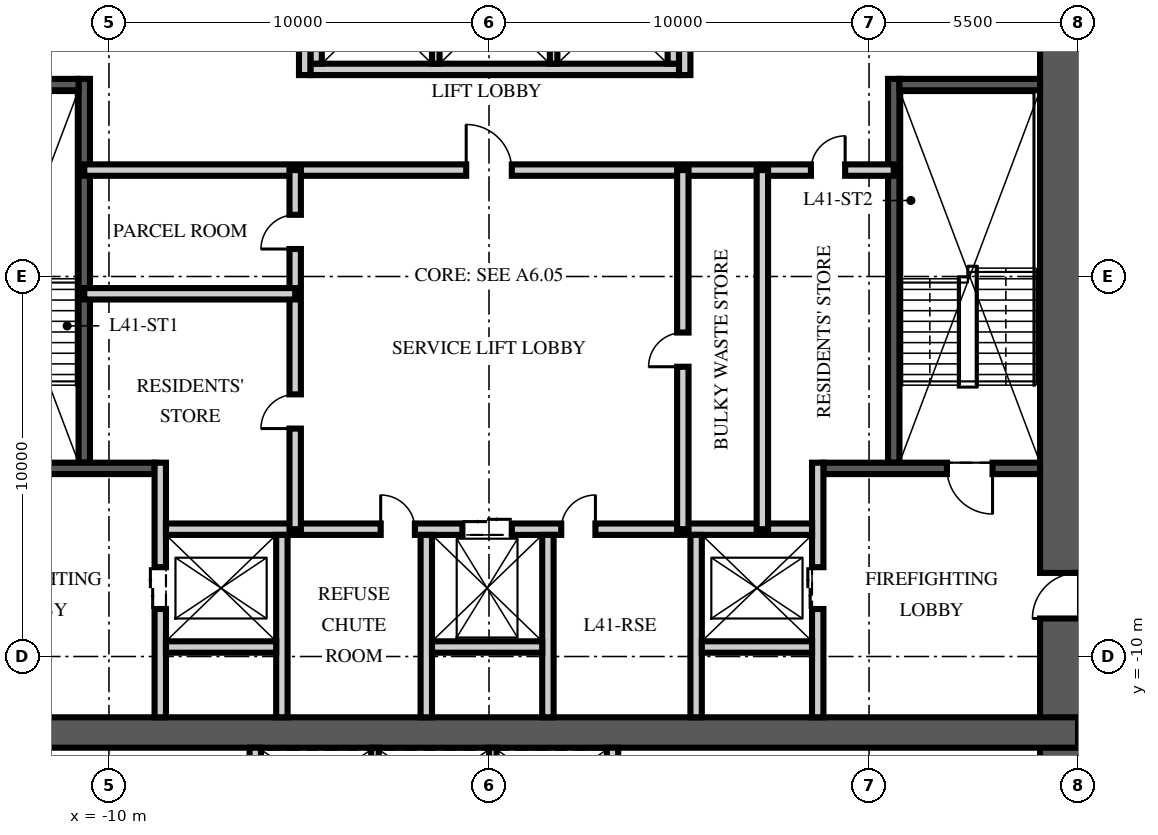
"""IFC4 building model, lengths in metres.
Left out: names, types, materials, properties, quantities, classifications, styles, units other than length and angle.
Written with IfcOpenShell. Run it as: python <this file> out.ifc"""

import sys

from ifc_helpers import new_model, si_unit, direction, frame, frame_2d, origin, place, context, subcontext, project, spatial, rectangle, extrude, element, fill, save


model = new_model("IFC4")
c1 = context("Model", 3, precision=1e-05, world=origin(), true_north=direction((0.0, 1.0)))
c2 = subcontext(c1, "Body", "Model", "MODEL_VIEW")
j1 = project(units=[si_unit("LENGTHUNIT", "METRE"), si_unit("PLANEANGLEUNIT", "RADIAN")], contexts=[c1])
p1 = place(None, origin())
s1 = spatial("IfcSite", under=j1, at=p1, CompositionType="ELEMENT")
p2 = place(p1, origin())
s2 = spatial("IfcBuilding", under=s1, at=p2, CompositionType="ELEMENT")
p3 = place(p2, frame((0.0, 0.0, 163.5)))
s3 = spatial("IfcBuildingStorey", under=s2, at=p3, CompositionType="ELEMENT", Elevation=163.5)
p4 = place(p3, frame((15.5, -15.5, -0.25), z_axis=(0.0, 0.0, 1.0), x_axis=(0.0, 1.0, 0.0)))
e1 = element("IfcWall", 1, at=p4, inside=s3, PredefinedType="SHEAR", context=c2, shape_type="SweptSolid", body=[
    extrude(rectangle(XDim=31.0, YDim=2.0, at=frame_2d((15.5, 0.0))), origin(), (0.0, 0.0, 1.0), 3.75),
])
p5 = place(p4, frame((6.5, 0.0, 0.25)))
e2 = element("IfcOpeningElement", 2, at=p5, cuts=e1, PredefinedType="OPENING", context=c2, shape_type="SweptSolid", body=[
    extrude(rectangle(XDim=1.2, YDim=2.1, at=frame_2d((0.6, 1.05))), frame((0.0, 1.01, 0.0), z_axis=(0.0, -1.0, 0.0), x_axis=(1.0, 0.0, 0.0)), (0.0, 0.0, 1.0), 2.02),
])
p6 = place(p4, frame((23.0, 0.0, 0.25)))
e3 = element("IfcOpeningElement", 3, at=p6, cuts=e1, PredefinedType="OPENING", context=c2, shape_type="SweptSolid", body=[
    extrude(rectangle(XDim=1.8, YDim=2.1, at=frame_2d((0.9, 1.05))), frame((0.0, 1.01, 0.0), z_axis=(0.0, -1.0, 0.0), x_axis=(1.0, 0.0, 0.0)), (0.0, 0.0, 1.0), 2.02),
])
p7 = place(p3, frame((-15.5, -12.0, -0.25), z_axis=(0.0, 0.0, 1.0), x_axis=(1.0, 0.0, 0.0)))
e4 = element("IfcWall", 4, at=p7, inside=s3, PredefinedType="SHEAR", context=c2, shape_type="SweptSolid", body=[
    extrude(rectangle(XDim=31.0, YDim=0.8, at=frame_2d((15.5, 0.0))), origin(), (0.0, 0.0, 1.0), 3.75),
])
p8 = place(p3, frame((-10.65, -4.9, 0.0), z_axis=(0.0, 0.0, 1.0), x_axis=(0.0, 1.0, 0.0)))
e5 = element("IfcWall", 5, at=p8, inside=s3, PredefinedType="SOLIDWALL", context=c2, shape_type="SweptSolid", body=[
    extrude(rectangle(XDim=10.1, YDim=0.3, at=frame_2d((5.05, 0.0))), origin(), (0.0, 0.0, 1.0), 3.5),
])
p9 = place(p3, frame((-14.5, -5.05, 0.0), z_axis=(0.0, 0.0, 1.0), x_axis=(1.0, 0.0, 0.0)))
e6 = element("IfcWall", 6, at=p9, inside=s3, PredefinedType="SOLIDWALL", context=c2, shape_type="SweptSolid", body=[
    extrude(rectangle(XDim=5.7, YDim=0.3, at=frame_2d((2.85, 0.0))), origin(), (0.0, 0.0, 1.0), 3.5),
])
p10 = place(p9, frame((1.25, 0.0, 0.0)))
e7 = element("IfcOpeningElement", 7, at=p10, cuts=e6, PredefinedType="OPENING", context=c2, shape_type="SweptSolid", body=[
    extrude(rectangle(XDim=1.2, YDim=2.1, at=frame_2d((0.6, 1.05))), frame((0.0, 0.16, 0.0), z_axis=(0.0, -1.0, 0.0), x_axis=(1.0, 0.0, 0.0)), (0.0, 0.0, 1.0), 0.32),
])
p11 = place(p3, frame((-14.5, 5.05, 0.0), z_axis=(0.0, 0.0, 1.0), x_axis=(1.0, 0.0, 0.0)))
e8 = element("IfcWall", 8, at=p11, inside=s3, PredefinedType="SOLIDWALL", context=c2, shape_type="SweptSolid", body=[
    extrude(rectangle(XDim=3.7, YDim=0.3, at=frame_2d((1.85, 0.0))), origin(), (0.0, 0.0, 1.0), 3.5),
])
p12 = place(p3, frame((-8.65, -11.6, 0.0), z_axis=(0.0, 0.0, 1.0), x_axis=(0.0, 1.0, 0.0)))
e9 = element("IfcWall", 9, at=p12, inside=s3, PredefinedType="PARTITIONING", context=c2, shape_type="SweptSolid", body=[
    extrude(rectangle(XDim=6.7, YDim=0.3, at=frame_2d((3.35, 0.0))), origin(), (0.0, 0.0, 1.0), 3.5),
])
p13 = place(p12, frame((2.85, 0.0, 0.0)))
e10 = element("IfcOpeningElement", 10, at=p13, cuts=e9, PredefinedType="OPENING", context=c2, shape_type="SweptSolid", body=[
    extrude(rectangle(XDim=1.1, YDim=2.1, at=frame_2d((0.55, 1.05))), frame((0.0, 0.16, 0.0), z_axis=(0.0, -1.0, 0.0), x_axis=(1.0, 0.0, 0.0)), (0.0, 0.0, 1.0), 0.32),
])
p14 = place(p3, frame((10.65, -4.9, 0.0), z_axis=(0.0, 0.0, 1.0), x_axis=(0.0, 1.0, 0.0)))
e11 = element("IfcWall", 11, at=p14, inside=s3, PredefinedType="SOLIDWALL", context=c2, shape_type="SweptSolid", body=[
    extrude(rectangle(XDim=10.1, YDim=0.3, at=frame_2d((5.05, 0.0))), origin(), (0.0, 0.0, 1.0), 3.5),
])
p15 = place(p3, frame((14.5, -5.05, 0.0), z_axis=(0.0, 0.0, 1.0), x_axis=(-1.0, 0.0, 0.0)))
e12 = element("IfcWall", 12, at=p15, inside=s3, PredefinedType="SOLIDWALL", context=c2, shape_type="SweptSolid", body=[
    extrude(rectangle(XDim=5.7, YDim=0.3, at=frame_2d((2.85, 0.0))), origin(), (0.0, 0.0, 1.0), 3.5),
])
p16 = place(p15, frame((1.25, 0.0, 0.0)))
e13 = element("IfcOpeningElement", 13, at=p16, cuts=e12, PredefinedType="OPENING", context=c2, shape_type="SweptSolid", body=[
    extrude(rectangle(XDim=1.2, YDim=2.1, at=frame_2d((0.6, 1.05))), frame((0.0, 0.16, 0.0), z_axis=(0.0, -1.0, 0.0), x_axis=(1.0, 0.0, 0.0)), (0.0, 0.0, 1.0), 0.32),
])
p17 = place(p3, frame((14.5, 5.05, 0.0), z_axis=(0.0, 0.0, 1.0), x_axis=(-1.0, 0.0, 0.0)))
e14 = element("IfcWall", 14, at=p17, inside=s3, PredefinedType="SOLIDWALL", context=c2, shape_type="SweptSolid", body=[
    extrude(rectangle(XDim=3.7, YDim=0.3, at=frame_2d((1.85, 0.0))), origin(), (0.0, 0.0, 1.0), 3.5),
])
p18 = place(p3, frame((8.65, -11.6, 0.0), z_axis=(0.0, 0.0, 1.0), x_axis=(0.0, 1.0, 0.0)))
e15 = element("IfcWall", 15, at=p18, inside=s3, PredefinedType="PARTITIONING", context=c2, shape_type="SweptSolid", body=[
    extrude(rectangle(XDim=6.7, YDim=0.3, at=frame_2d((3.35, 0.0))), origin(), (0.0, 0.0, 1.0), 3.5),
])
p19 = place(p18, frame((2.85, 0.0, 0.0)))
e16 = element("IfcOpeningElement", 16, at=p19, cuts=e15, PredefinedType="OPENING", context=c2, shape_type="SweptSolid", body=[
    extrude(rectangle(XDim=1.1, YDim=2.1, at=frame_2d((0.55, 1.05))), frame((0.0, 0.16, 0.0), z_axis=(0.0, -1.0, 0.0), x_axis=(1.0, 0.0, 0.0)), (0.0, 0.0, 1.0), 0.32),
])
p20 = place(p3, frame((-8.5, -6.65, 0.0), z_axis=(0.0, 0.0, 1.0), x_axis=(1.0, 0.0, 0.0)))
e17 = element("IfcWall", 17, at=p20, inside=s3, PredefinedType="PARTITIONING", context=c2, shape_type="SweptSolid", body=[
    extrude(rectangle(XDim=17.0, YDim=0.3, at=frame_2d((8.5, 0.0))), origin(), (0.0, 0.0, 1.0), 3.5),
])
p21 = place(p20, frame((7.8, 0.0, 0.0)))
e18 = element("IfcOpeningElement", 18, at=p21, cuts=e17, PredefinedType="OPENING", context=c2, shape_type="SweptSolid", body=[
    extrude(rectangle(XDim=1.3, YDim=2.4, at=frame_2d((0.65, 1.2))), frame((0.0, 0.16, 0.0), z_axis=(0.0, -1.0, 0.0), x_axis=(1.0, 0.0, 0.0)), (0.0, 0.0, 1.0), 0.32),
])
p22 = place(p20, frame((5.65, 0.0, 0.0)))
e19 = element("IfcOpeningElement", 19, at=p22, cuts=e17, PredefinedType="OPENING", context=c2, shape_type="SweptSolid", body=[
    extrude(rectangle(XDim=0.9, YDim=2.1, at=frame_2d((0.45, 1.05))), frame((0.0, 0.16, 0.0), z_axis=(0.0, -1.0, 0.0), x_axis=(1.0, 0.0, 0.0)), (0.0, 0.0, 1.0), 0.32),
])
p23 = place(p20, frame((10.4, 0.0, 0.0)))
e20 = element("IfcOpeningElement", 20, at=p23, cuts=e17, PredefinedType="OPENING", context=c2, shape_type="SweptSolid", body=[
    extrude(rectangle(XDim=0.9, YDim=2.1, at=frame_2d((0.45, 1.05))), frame((0.0, 0.16, 0.0), z_axis=(0.0, -1.0, 0.0), x_axis=(1.0, 0.0, 0.0)), (0.0, 0.0, 1.0), 0.32),
])
for number, where, z_axis, x_axis in (
    (21, (-5.45, -11.6, 0.0), (0.0, 0.0, 1.0), (0.0, 1.0, 0.0)),
    (22, (-1.65, -11.6, 0.0), (0.0, 0.0, 1.0), (0.0, 1.0, 0.0)),
    (23, (1.55, -11.6, 0.0), (0.0, 0.0, 1.0), (0.0, 1.0, 0.0)),
    (24, (5.45, -11.6, 0.0), (0.0, 0.0, 1.0), (0.0, 1.0, 0.0)),
):
    element("IfcWall", number, at=place(p3, frame(where, z_axis=z_axis, x_axis=x_axis)), inside=s3, PredefinedType="PARTITIONING", context=c2, shape_type="SweptSolid", body=[
        extrude(rectangle(XDim=4.8, YDim=0.3, at=frame_2d((2.4, 0.0))), origin(), (0.0, 0.0, 1.0), 3.5),
    ])
for number, where, z_axis, x_axis in (
    (25, (-8.5, -9.75, 0.0), (0.0, 0.0, 1.0), (1.0, 0.0, 0.0)),
    (26, (-1.5, -9.75, 0.0), (0.0, 0.0, 1.0), (1.0, 0.0, 0.0)),
    (27, (5.6, -9.75, 0.0), (0.0, 0.0, 1.0), (1.0, 0.0, 0.0)),
):
    element("IfcWall", number, at=place(p3, frame(where, z_axis=z_axis, x_axis=x_axis)), inside=s3, PredefinedType="PARTITIONING", context=c2, shape_type="SweptSolid", body=[
        extrude(rectangle(XDim=2.9, YDim=0.3, at=frame_2d((1.45, 0.0))), origin(), (0.0, 0.0, 1.0), 3.5),
    ])
p24 = place(p3, frame((-4.7, 5.45, 0.0), z_axis=(0.0, 0.0, 1.0), x_axis=(1.0, 0.0, 0.0)))
e28 = element("IfcWall", 28, at=p24, inside=s3, PredefinedType="PARTITIONING", context=c2, shape_type="SweptSolid", body=[
    extrude(rectangle(XDim=9.7, YDim=0.3, at=frame_2d((4.85, 0.0))), origin(), (0.0, 0.0, 1.0), 3.5),
])
for number, where, z_axis, x_axis in (
    (29, (-4.55, 5.6, 0.0), (0.0, 0.0, 1.0), (0.0, 1.0, 0.0)),
    (30, (4.85, 5.6, 0.0), (0.0, 0.0, 1.0), (0.0, 1.0, 0.0)),
):
    element("IfcWall", number, at=place(p3, frame(where, z_axis=z_axis, x_axis=x_axis)), inside=s3, PredefinedType="PARTITIONING", context=c2, shape_type="SweptSolid", body=[
        extrude(rectangle(XDim=2.8, YDim=0.3, at=frame_2d((1.4, 0.0))), origin(), (0.0, 0.0, 1.0), 3.5),
    ])
for number, where, z_axis, x_axis in (
    (31, (-1.4, 5.6, 0.0), (0.0, 0.0, 1.0), (0.0, 1.0, 0.0)),
    (32, (1.7, 5.6, 0.0), (0.0, 0.0, 1.0), (0.0, 1.0, 0.0)),
):
    element("IfcWall", number, at=place(p3, frame(where, z_axis=z_axis, x_axis=x_axis)), inside=s3, PredefinedType="PARTITIONING", context=c2, shape_type="SweptSolid", body=[
        extrude(rectangle(XDim=2.8, YDim=0.2, at=frame_2d((1.4, 0.0))), origin(), (0.0, 0.0, 1.0), 3.5),
    ])
for number, where, z_axis, x_axis in (
    (33, (-6.15, -14.5, 0.0), (0.0, 0.0, 1.0), (0.0, 1.0, 0.0)),
    (34, (3.25, -14.5, 0.0), (0.0, 0.0, 1.0), (0.0, 1.0, 0.0)),
):
    element("IfcWall", number, at=place(p3, frame(where, z_axis=z_axis, x_axis=x_axis)), inside=s3, PredefinedType="PARTITIONING", context=c2, shape_type="SweptSolid", body=[
        extrude(rectangle(XDim=2.1, YDim=0.3, at=frame_2d((1.05, 0.0))), origin(), (0.0, 0.0, 1.0), 3.5),
    ])
for number, where, z_axis, x_axis in (
    (35, (-3.0, -14.5, 0.0), (0.0, 0.0, 1.0), (0.0, 1.0, 0.0)),
    (36, (0.1, -14.5, 0.0), (0.0, 0.0, 1.0), (0.0, 1.0, 0.0)),
):
    element("IfcWall", number, at=place(p3, frame(where, z_axis=z_axis, x_axis=x_axis)), inside=s3, PredefinedType="PARTITIONING", context=c2, shape_type="SweptSolid", body=[
        extrude(rectangle(XDim=2.1, YDim=0.2, at=frame_2d((1.05, 0.0))), origin(), (0.0, 0.0, 1.0), 3.5),
    ])
p25 = place(p3, frame((-10.65, 2.8, 0.0), z_axis=(0.0, 0.0, 1.0), x_axis=(1.0, 0.0, 0.0)))
e37 = element("IfcWall", 37, at=p25, inside=s3, PredefinedType="PARTITIONING", context=c2, shape_type="SweptSolid", body=[
    extrude(rectangle(XDim=21.3, YDim=0.3, at=frame_2d((10.65, 0.0))), origin(), (0.0, 0.0, 1.0), 3.5),
])
p26 = place(p25, frame((10.05, 0.0, 0.0)))
e38 = element("IfcOpeningElement", 38, at=p26, cuts=e37, PredefinedType="OPENING", context=c2, shape_type="SweptSolid", body=[
    extrude(rectangle(XDim=1.2, YDim=2.1, at=frame_2d((0.6, 1.05))), frame((0.0, 0.16, 0.0), z_axis=(0.0, -1.0, 0.0), x_axis=(1.0, 0.0, 0.0)), (0.0, 0.0, 1.0), 0.32),
])
p27 = place(p25, frame((19.121, 0.0, 0.0)))
e39 = element("IfcOpeningElement", 39, at=p27, cuts=e37, PredefinedType="OPENING", context=c2, shape_type="SweptSolid", body=[
    extrude(rectangle(XDim=0.9, YDim=2.1, at=frame_2d((0.45, 1.05))), frame((0.0, 0.16, 0.0), z_axis=(0.0, -1.0, 0.0), x_axis=(1.0, 0.0, 0.0)), (0.0, 0.0, 1.0), 0.32),
])
p28 = place(p3, frame((-5.1, -6.65, 0.0), z_axis=(0.0, 0.0, 1.0), x_axis=(0.0, 1.0, 0.0)))
e40 = element("IfcWall", 40, at=p28, inside=s3, PredefinedType="PARTITIONING", context=c2, shape_type="SweptSolid", body=[
    extrude(rectangle(XDim=9.45, YDim=0.3, at=frame_2d((4.725, 0.0))), origin(), (0.0, 0.0, 1.0), 3.5),
])
p29 = place(p28, frame((2.648, 0.0, 0.0)))
e41 = element("IfcOpeningElement", 41, at=p29, cuts=e40, PredefinedType="OPENING", context=c2, shape_type="SweptSolid", body=[
    extrude(rectangle(XDim=0.9, YDim=2.1, at=frame_2d((0.45, 1.05))), frame((0.0, 0.16, 0.0), z_axis=(0.0, -1.0, 0.0), x_axis=(1.0, 0.0, 0.0)), (0.0, 0.0, 1.0), 0.32),
])
p30 = place(p28, frame((7.373, 0.0, 0.0)))
e42 = element("IfcOpeningElement", 42, at=p30, cuts=e40, PredefinedType="OPENING", context=c2, shape_type="SweptSolid", body=[
    extrude(rectangle(XDim=0.9, YDim=2.1, at=frame_2d((0.45, 1.05))), frame((0.0, 0.16, 0.0), z_axis=(0.0, -1.0, 0.0), x_axis=(1.0, 0.0, 0.0)), (0.0, 0.0, 1.0), 0.32),
])
p31 = place(p3, frame((5.1, -6.65, 0.0), z_axis=(0.0, 0.0, 1.0), x_axis=(0.0, 1.0, 0.0)))
e43 = element("IfcWall", 43, at=p31, inside=s3, PredefinedType="PARTITIONING", context=c2, shape_type="SweptSolid", body=[
    extrude(rectangle(XDim=9.45, YDim=0.3, at=frame_2d((4.725, 0.0))), origin(), (0.0, 0.0, 1.0), 3.5),
])
p32 = place(p31, frame((4.275, 0.0, 0.0)))
e44 = element("IfcOpeningElement", 44, at=p32, cuts=e43, PredefinedType="OPENING", context=c2, shape_type="SweptSolid", body=[
    extrude(rectangle(XDim=0.9, YDim=2.1, at=frame_2d((0.45, 1.05))), frame((0.0, 0.16, 0.0), z_axis=(0.0, -1.0, 0.0), x_axis=(1.0, 0.0, 0.0)), (0.0, 0.0, 1.0), 0.32),
])
p33 = place(p3, frame((-10.65, -0.455, 0.0), z_axis=(0.0, 0.0, 1.0), x_axis=(1.0, 0.0, 0.0)))
e45 = element("IfcWall", 45, at=p33, inside=s3, PredefinedType="PARTITIONING", context=c2, shape_type="SweptSolid", body=[
    extrude(rectangle(XDim=5.55, YDim=0.3, at=frame_2d((2.775, 0.0))), origin(), (0.0, 0.0, 1.0), 3.5),
])
p34 = place(p3, frame((7.193, -6.65, 0.0), z_axis=(0.0, 0.0, 1.0), x_axis=(0.0, 1.0, 0.0)))
e46 = element("IfcWall", 46, at=p34, inside=s3, PredefinedType="PARTITIONING", context=c2, shape_type="SweptSolid", body=[
    extrude(rectangle(XDim=9.45, YDim=0.3, at=frame_2d((4.725, 0.0))), origin(), (0.0, 0.0, 1.0), 3.5),
])
p35 = place(p3, frame((-4.85, 5.3, 0.0), z_axis=(0.0, 0.0, 1.0), x_axis=(0.0, 1.0, 0.0)))
e47 = element("IfcWall", 47, at=p35, inside=s3, PredefinedType="PARTITIONING", context=c2, shape_type="SweptSolid", body=[
    extrude(rectangle(XDim=6.3, YDim=0.3, at=frame_2d((3.15, 0.0))), origin(), (0.0, 0.0, 1.0), 3.5),
])
p36 = place(p3, frame((5.15, 5.3, 0.0), z_axis=(0.0, 0.0, 1.0), x_axis=(0.0, 1.0, 0.0)))
e48 = element("IfcWall", 48, at=p36, inside=s3, PredefinedType="PARTITIONING", context=c2, shape_type="SweptSolid", body=[
    extrude(rectangle(XDim=6.3, YDim=0.3, at=frame_2d((3.15, 0.0))), origin(), (0.0, 0.0, 1.0), 3.5),
])
p37 = place(p36, frame((4.35, 0.0, 0.0)))
e49 = element("IfcOpeningElement", 49, at=p37, cuts=e48, PredefinedType="OPENING", context=c2, shape_type="SweptSolid", body=[
    extrude(rectangle(XDim=0.9, YDim=2.1, at=frame_2d((0.45, 1.05))), frame((0.0, 0.16, 0.0), z_axis=(0.0, -1.0, 0.0), x_axis=(1.0, 0.0, 0.0)), (0.0, 0.0, 1.0), 0.32),
])
p38 = place(p16, origin())
e50 = element("IfcDoor", 50, at=p38, inside=s3, OperationType="SINGLE_SWING_LEFT", PredefinedType="DOOR", context=c2, shape_type="SweptSolid", body=[
    extrude(rectangle(XDim=1.2, YDim=2.1, at=frame_2d((0.6, 1.05))), frame((0.0, 0.025, 0.0), z_axis=(0.0, -1.0, 0.0), x_axis=(1.0, 0.0, 0.0)), (0.0, 0.0, 1.0), 0.05),
])
fill(e13, e50)
p39 = place(p5, origin())
e51 = element("IfcDoor", 51, at=p39, inside=s3, OperationType="SINGLE_SWING_LEFT", PredefinedType="DOOR", context=c2, shape_type="SweptSolid", body=[
    extrude(rectangle(XDim=1.2, YDim=2.1, at=frame_2d((0.6, 1.05))), frame((0.0, 0.025, 0.0), z_axis=(0.0, -1.0, 0.0), x_axis=(1.0, 0.0, 0.0)), (0.0, 0.0, 1.0), 0.05),
])
fill(e2, e51)
p40 = place(p13, origin())
e52 = element("IfcDoor", 52, at=p40, inside=s3, OperationType="DOUBLE_DOOR_SLIDING", PredefinedType="DOOR", context=c2, shape_type="SweptSolid", body=[
    extrude(rectangle(XDim=1.1, YDim=2.1, at=frame_2d((0.55, 1.05))), frame((0.0, 0.025, 0.0), z_axis=(0.0, -1.0, 0.0), x_axis=(1.0, 0.0, 0.0)), (0.0, 0.0, 1.0), 0.05),
])
fill(e10, e52)
p41 = place(p19, origin())
e53 = element("IfcDoor", 53, at=p41, inside=s3, OperationType="DOUBLE_DOOR_SLIDING", PredefinedType="DOOR", context=c2, shape_type="SweptSolid", body=[
    extrude(rectangle(XDim=1.1, YDim=2.1, at=frame_2d((0.55, 1.05))), frame((0.0, 0.025, 0.0), z_axis=(0.0, -1.0, 0.0), x_axis=(1.0, 0.0, 0.0)), (0.0, 0.0, 1.0), 0.05),
])
fill(e16, e53)
p42 = place(p21, origin())
e54 = element("IfcDoor", 54, at=p42, inside=s3, OperationType="DOUBLE_DOOR_SLIDING", PredefinedType="DOOR", context=c2, shape_type="SweptSolid", body=[
    extrude(rectangle(XDim=1.3, YDim=2.4, at=frame_2d((0.65, 1.2))), frame((0.0, 0.025, 0.0), z_axis=(0.0, -1.0, 0.0), x_axis=(1.0, 0.0, 0.0)), (0.0, 0.0, 1.0), 0.05),
])
fill(e18, e54)
p43 = place(p26, origin())
e55 = element("IfcDoor", 55, at=p43, inside=s3, OperationType="SINGLE_SWING_LEFT", PredefinedType="DOOR", context=c2, shape_type="SweptSolid", body=[
    extrude(rectangle(XDim=1.2, YDim=2.1, at=frame_2d((0.6, 1.05))), frame((0.0, 0.025, 0.0), z_axis=(0.0, -1.0, 0.0), x_axis=(1.0, 0.0, 0.0)), (0.0, 0.0, 1.0), 0.05),
])
fill(e38, e55)
p44 = place(p22, origin())
e56 = element("IfcDoor", 56, at=p44, inside=s3, OperationType="SINGLE_SWING_LEFT", PredefinedType="DOOR", context=c2, shape_type="SweptSolid", body=[
    extrude(rectangle(XDim=0.9, YDim=2.1, at=frame_2d((0.45, 1.05))), frame((0.0, 0.025, 0.0), z_axis=(0.0, -1.0, 0.0), x_axis=(1.0, 0.0, 0.0)), (0.0, 0.0, 1.0), 0.05),
])
fill(e19, e56)
p45 = place(p23, origin())
e57 = element("IfcDoor", 57, at=p45, inside=s3, OperationType="SINGLE_SWING_RIGHT", PredefinedType="DOOR", context=c2, shape_type="SweptSolid", body=[
    extrude(rectangle(XDim=0.9, YDim=2.1, at=frame_2d((0.45, 1.05))), frame((0.0, 0.025, 0.0), z_axis=(0.0, -1.0, 0.0), x_axis=(1.0, 0.0, 0.0)), (0.0, 0.0, 1.0), 0.05),
])
fill(e20, e57)
p46 = place(p29, origin())
e58 = element("IfcDoor", 58, at=p46, inside=s3, OperationType="SINGLE_SWING_LEFT", PredefinedType="DOOR", context=c2, shape_type="SweptSolid", body=[
    extrude(rectangle(XDim=0.9, YDim=2.1, at=frame_2d((0.45, 1.05))), frame((0.0, 0.025, 0.0), z_axis=(0.0, -1.0, 0.0), x_axis=(1.0, 0.0, 0.0)), (0.0, 0.0, 1.0), 0.05),
])
fill(e41, e58)
p47 = place(p30, origin())
e59 = element("IfcDoor", 59, at=p47, inside=s3, OperationType="SINGLE_SWING_LEFT", PredefinedType="DOOR", context=c2, shape_type="SweptSolid", body=[
    extrude(rectangle(XDim=0.9, YDim=2.1, at=frame_2d((0.45, 1.05))), frame((0.0, 0.025, 0.0), z_axis=(0.0, -1.0, 0.0), x_axis=(1.0, 0.0, 0.0)), (0.0, 0.0, 1.0), 0.05),
])
fill(e42, e59)
p48 = place(p32, origin())
e60 = element("IfcDoor", 60, at=p48, inside=s3, OperationType="SINGLE_SWING_LEFT", PredefinedType="DOOR", context=c2, shape_type="SweptSolid", body=[
    extrude(rectangle(XDim=0.9, YDim=2.1, at=frame_2d((0.45, 1.05))), frame((0.0, 0.025, 0.0), z_axis=(0.0, -1.0, 0.0), x_axis=(1.0, 0.0, 0.0)), (0.0, 0.0, 1.0), 0.05),
])
fill(e44, e60)
p49 = place(p27, origin())
e61 = element("IfcDoor", 61, at=p49, inside=s3, OperationType="SINGLE_SWING_RIGHT", PredefinedType="DOOR", context=c2, shape_type="SweptSolid", body=[
    extrude(rectangle(XDim=0.9, YDim=2.1, at=frame_2d((0.45, 1.05))), frame((0.0, 0.025, 0.0), z_axis=(0.0, -1.0, 0.0), x_axis=(1.0, 0.0, 0.0)), (0.0, 0.0, 1.0), 0.05),
])
fill(e39, e61)
save(model, sys.argv[1])
